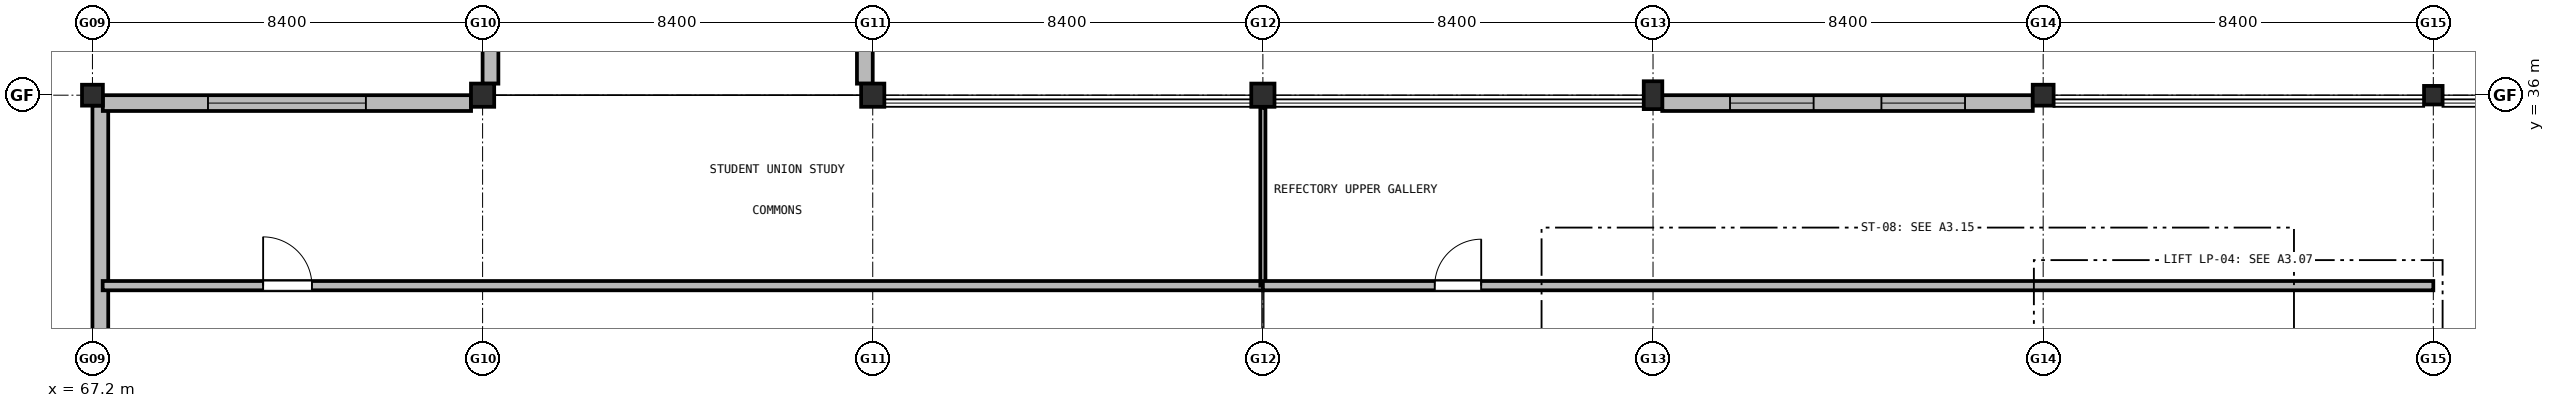
"""IFC4 building model, lengths in metres.
Left out: names, types, materials, properties, quantities, classifications, styles, units other than length and angle.
Written with IfcOpenShell. Run it as: python <this file> out.ifc"""

import sys

from ifc_helpers import new_model, si_unit, direction, frame, frame_2d, origin, origin_2d, place, context, subcontext, project, spatial, rectangle, extrude, element, fill, save


model = new_model("IFC4")
c1 = context("Model", 3, precision=1e-05, world=origin(), true_north=direction((0.0, 1.0)))
c2 = subcontext(c1, "Body", "Model", "MODEL_VIEW")
j1 = project(units=[si_unit("LENGTHUNIT", "METRE"), si_unit("PLANEANGLEUNIT", "RADIAN")], contexts=[c1])
p1 = place(None, origin())
s1 = spatial("IfcSite", under=j1, at=p1, CompositionType="ELEMENT")
p2 = place(p1, origin())
s2 = spatial("IfcBuilding", under=s1, at=p2, CompositionType="ELEMENT")
p3 = place(p2, frame((0.0, 0.0, 5.1)))
s3 = spatial("IfcBuildingStorey", under=s2, at=p3, CompositionType="ELEMENT", Elevation=5.1)
p4 = place(p3, frame((67.2, 36.0, 0.0), z_axis=(0.0, 0.0, 1.0), x_axis=(1.0, 0.0, 0.0)))
e1 = element("IfcColumn", 1, at=p4, inside=s3, PredefinedType="COLUMN", context=c2, shape_type="SweptSolid", body=[
    extrude(rectangle(XDim=0.45, YDim=0.45, at=origin_2d()), origin(), (0.0, 0.0, 1.0), 4.2),
])
for number, where, z_axis, x_axis in (
    (2, (75.6, 36.0, 0.0), (0.0, 0.0, 1.0), (1.0, 0.0, 0.0)),
    (3, (84.0, 36.0, 0.0), (0.0, 0.0, 1.0), (1.0, 0.0, 0.0)),
    (4, (92.4, 36.0, 0.0), (0.0, 0.0, 1.0), (1.0, 0.0, 0.0)),
):
    element("IfcColumn", number, at=place(p3, frame(where, z_axis=z_axis, x_axis=x_axis)), inside=s3, PredefinedType="COLUMN", context=c2, shape_type="SweptSolid", body=[
        extrude(rectangle(XDim=0.5, YDim=0.5, at=origin_2d()), origin(), (0.0, 0.0, 1.0), 4.2),
    ])
p5 = place(p3, frame((100.8, 36.0, 0.0), z_axis=(0.0, 0.0, 1.0), x_axis=(1.0, 0.0, 0.0)))
e5 = element("IfcColumn", 5, at=p5, inside=s3, PredefinedType="COLUMN", context=c2, shape_type="SweptSolid", body=[
    extrude(rectangle(XDim=0.4, YDim=0.6, at=origin_2d()), origin(), (0.0, 0.0, 1.0), 4.2),
])
p6 = place(p3, frame((109.2, 36.0, 0.0), z_axis=(0.0, 0.0, 1.0), x_axis=(1.0, 0.0, 0.0)))
e6 = element("IfcColumn", 6, at=p6, inside=s3, PredefinedType="COLUMN", context=c2, shape_type="SweptSolid", body=[
    extrude(rectangle(XDim=0.45, YDim=0.45, at=origin_2d()), origin(), (0.0, 0.0, 1.0), 4.2),
])
p7 = place(p3, frame((117.6, 36.0, 0.0), z_axis=(0.0, 0.0, 1.0), x_axis=(1.0, 0.0, 0.0)))
e7 = element("IfcColumn", 7, at=p7, inside=s3, PredefinedType="COLUMN", context=c2, shape_type="SweptSolid", body=[
    extrude(rectangle(XDim=0.4, YDim=0.4, at=origin_2d()), origin(), (0.0, 0.0, 1.0), 4.2),
])
p8 = place(p3, frame((83.83, 42.952, 0.0), z_axis=(0.0, 0.0, 1.0), x_axis=(0.0, -1.0, 0.0)))
e8 = element("IfcWall", 8, at=p8, inside=s3, PredefinedType="SOLIDWALL", context=c2, shape_type="SweptSolid", body=[
    extrude(rectangle(XDim=6.704, YDim=0.34, at=frame_2d((3.352, 0.0))), origin(), (0.0, 0.0, 1.0), 3.31),
])
p9 = place(p8, frame((2.352, 0.0, 0.95)))
e9 = element("IfcOpeningElement", 9, at=p9, cuts=e8, PredefinedType="OPENING", context=c2, shape_type="SweptSolid", body=[
    extrude(rectangle(XDim=2.0, YDim=2.0, at=frame_2d((1.0, 1.0))), frame((0.0, 0.18, 0.0), z_axis=(0.0, -1.0, 0.0), x_axis=(1.0, 0.0, 0.0)), (0.0, 0.0, 1.0), 0.36),
])
p10 = place(p3, frame((100.998, 35.83, 0.0), z_axis=(0.0, 0.0, 1.0), x_axis=(1.0, 0.0, 0.0)))
e10 = element("IfcWall", 10, at=p10, inside=s3, PredefinedType="SOLIDWALL", context=c2, shape_type="SweptSolid", body=[
    extrude(rectangle(XDim=7.979, YDim=0.34, at=frame_2d((3.99, 0.0))), origin(), (0.0, 0.0, 1.0), 3.11),
])
p11 = place(p10, frame((1.46, 0.0, 0.95)))
e11 = element("IfcOpeningElement", 11, at=p11, cuts=e10, PredefinedType="OPENING", context=c2, shape_type="SweptSolid", body=[
    extrude(rectangle(XDim=1.8, YDim=1.91, at=frame_2d((0.9, 0.955))), frame((0.0, 0.18, 0.0), z_axis=(0.0, -1.0, 0.0), x_axis=(1.0, 0.0, 0.0)), (0.0, 0.0, 1.0), 0.36),
])
p12 = place(p10, frame((4.719, 0.0, 0.95)))
e12 = element("IfcOpeningElement", 12, at=p12, cuts=e10, PredefinedType="OPENING", context=c2, shape_type="SweptSolid", body=[
    extrude(rectangle(XDim=1.8, YDim=1.91, at=frame_2d((0.9, 0.955))), frame((0.0, 0.18, 0.0), z_axis=(0.0, -1.0, 0.0), x_axis=(1.0, 0.0, 0.0)), (0.0, 0.0, 1.0), 0.36),
])
p13 = place(p3, frame((67.37, 29.023, 0.0), z_axis=(0.0, 0.0, 1.0), x_axis=(0.0, 1.0, 0.0)))
e13 = element("IfcWall", 13, at=p13, inside=s3, PredefinedType="SOLIDWALL", context=c2, shape_type="SweptSolid", body=[
    extrude(rectangle(XDim=6.754, YDim=0.34, at=frame_2d((3.377, 0.0))), origin(), (0.0, 0.0, 1.0), 3.31),
])
p14 = place(p3, frame((67.423, 35.83, 0.0), z_axis=(0.0, 0.0, 1.0), x_axis=(1.0, 0.0, 0.0)))
e14 = element("IfcWall", 14, at=p14, inside=s3, PredefinedType="SOLIDWALL", context=c2, shape_type="SweptSolid", body=[
    extrude(rectangle(XDim=7.929, YDim=0.34, at=frame_2d((3.964, 0.0))), origin(), (0.0, 0.0, 1.0), 3.11),
])
p15 = place(p14, frame((2.264, 0.0, 0.95)))
e15 = element("IfcOpeningElement", 15, at=p15, cuts=e14, PredefinedType="OPENING", context=c2, shape_type="SweptSolid", body=[
    extrude(rectangle(XDim=3.4, YDim=1.8, at=frame_2d((1.7, 0.9))), frame((0.0, 0.18, 0.0), z_axis=(0.0, -1.0, 0.0), x_axis=(1.0, 0.0, 0.0)), (0.0, 0.0, 1.0), 0.36),
])
p16 = place(p3, frame((75.77, 36.248, 0.0), z_axis=(0.0, 0.0, 1.0), x_axis=(0.0, 1.0, 0.0)))
e16 = element("IfcWall", 16, at=p16, inside=s3, PredefinedType="SOLIDWALL", context=c2, shape_type="SweptSolid", body=[
    extrude(rectangle(XDim=6.704, YDim=0.34, at=frame_2d((3.352, 0.0))), origin(), (0.0, 0.0, 1.0), 3.31),
])
p17 = place(p16, frame((2.252, 0.0, 0.95)))
e17 = element("IfcOpeningElement", 17, at=p17, cuts=e16, PredefinedType="OPENING", context=c2, shape_type="SweptSolid", body=[
    extrude(rectangle(XDim=2.2, YDim=1.7, at=frame_2d((1.1, 0.85))), frame((0.0, 0.18, 0.0), z_axis=(0.0, -1.0, 0.0), x_axis=(1.0, 0.0, 0.0)), (0.0, 0.0, 1.0), 0.36),
])
p18 = place(p3, frame((67.42, 31.9, 0.0), z_axis=(0.0, 0.0, 1.0), x_axis=(1.0, 0.0, 0.0)))
e18 = element("IfcWall", 18, at=p18, inside=s3, PredefinedType="SOLIDWALL", context=c2, shape_type="SweptSolid", body=[
    extrude(rectangle(XDim=24.98, YDim=0.2, at=frame_2d((12.49, 0.0))), origin(), (0.0, 0.0, 1.0), 3.305),
])
p19 = place(p18, frame((3.455, 0.0, 0.0)))
e19 = element("IfcOpeningElement", 19, at=p19, cuts=e18, PredefinedType="OPENING", context=c2, shape_type="SweptSolid", body=[
    extrude(rectangle(XDim=1.05, YDim=2.15, at=frame_2d((0.525, 1.075))), frame((0.0, 0.11, 0.0), z_axis=(0.0, -1.0, 0.0), x_axis=(1.0, 0.0, 0.0)), (0.0, 0.0, 1.0), 0.22),
])
p20 = place(p3, frame((92.4, 31.9, 0.0), z_axis=(0.0, 0.0, 1.0), x_axis=(0.0, 1.0, 0.0)))
e20 = element("IfcWall", 20, at=p20, inside=s3, PredefinedType="PARTITIONING", context=c2, shape_type="SweptSolid", body=[
    extrude(rectangle(XDim=3.83, YDim=0.11, at=frame_2d((1.915, 0.0))), origin(), (0.0, 0.0, 1.0), 3.105),
])
p21 = place(p3, frame((92.4, 31.9, 0.0), z_axis=(0.0, 0.0, 1.0), x_axis=(1.0, 0.0, 0.0)))
e21 = element("IfcWall", 21, at=p21, inside=s3, PredefinedType="SOLIDWALL", context=c2, shape_type="SweptSolid", body=[
    extrude(rectangle(XDim=25.2, YDim=0.2, at=frame_2d((12.6, 0.0))), origin(), (0.0, 0.0, 1.0), 3.305),
])
p22 = place(p21, frame((3.7, 0.0, 0.0)))
e22 = element("IfcOpeningElement", 22, at=p22, cuts=e21, PredefinedType="OPENING", context=c2, shape_type="SweptSolid", body=[
    extrude(rectangle(XDim=1.0, YDim=2.1, at=frame_2d((0.5, 1.05))), frame((0.0, 0.11, 0.0), z_axis=(0.0, -1.0, 0.0), x_axis=(1.0, 0.0, 0.0)), (0.0, 0.0, 1.0), 0.22),
])
p23 = place(p11, origin())
e23 = element("IfcWindow", 23, at=p23, inside=s3, PartitioningType="SINGLE_PANEL", PredefinedType="WINDOW", context=c2, shape_type="SweptSolid", body=[
    extrude(rectangle(XDim=1.8, YDim=1.91, at=frame_2d((0.9, 0.955))), frame((0.0, 0.03, 0.0), z_axis=(0.0, -1.0, 0.0), x_axis=(1.0, 0.0, 0.0)), (0.0, 0.0, 1.0), 0.06),
])
fill(e11, e23)
p24 = place(p12, origin())
e24 = element("IfcWindow", 24, at=p24, inside=s3, PartitioningType="SINGLE_PANEL", PredefinedType="WINDOW", context=c2, shape_type="SweptSolid", body=[
    extrude(rectangle(XDim=1.8, YDim=1.91, at=frame_2d((0.9, 0.955))), frame((0.0, 0.03, 0.0), z_axis=(0.0, -1.0, 0.0), x_axis=(1.0, 0.0, 0.0)), (0.0, 0.0, 1.0), 0.06),
])
fill(e12, e24)
p25 = place(p15, origin())
e25 = element("IfcWindow", 25, at=p25, inside=s3, PartitioningType="SINGLE_PANEL", PredefinedType="WINDOW", context=c2, shape_type="SweptSolid", body=[
    extrude(rectangle(XDim=3.4, YDim=1.8, at=frame_2d((1.7, 0.9))), frame((0.0, 0.03, 0.0), z_axis=(0.0, -1.0, 0.0), x_axis=(1.0, 0.0, 0.0)), (0.0, 0.0, 1.0), 0.06),
])
fill(e15, e25)
p26 = place(p19, origin())
e26 = element("IfcDoor", 26, at=p26, inside=s3, OperationType="SINGLE_SWING_LEFT", PredefinedType="DOOR", context=c2, shape_type="SweptSolid", body=[
    extrude(rectangle(XDim=1.05, YDim=2.15, at=frame_2d((0.525, 1.075))), frame((0.0, 0.025, 0.0), z_axis=(0.0, -1.0, 0.0), x_axis=(1.0, 0.0, 0.0)), (0.0, 0.0, 1.0), 0.05),
])
fill(e19, e26)
p27 = place(p22, origin())
e27 = element("IfcDoor", 27, at=p27, inside=s3, OperationType="SINGLE_SWING_RIGHT", PredefinedType="DOOR", context=c2, shape_type="SweptSolid", body=[
    extrude(rectangle(XDim=1.0, YDim=2.1, at=frame_2d((0.5, 1.05))), frame((0.0, 0.025, 0.0), z_axis=(0.0, -1.0, 0.0), x_axis=(1.0, 0.0, 0.0)), (0.0, 0.0, 1.0), 0.05),
])
fill(e22, e27)
save(model, sys.argv[1])
